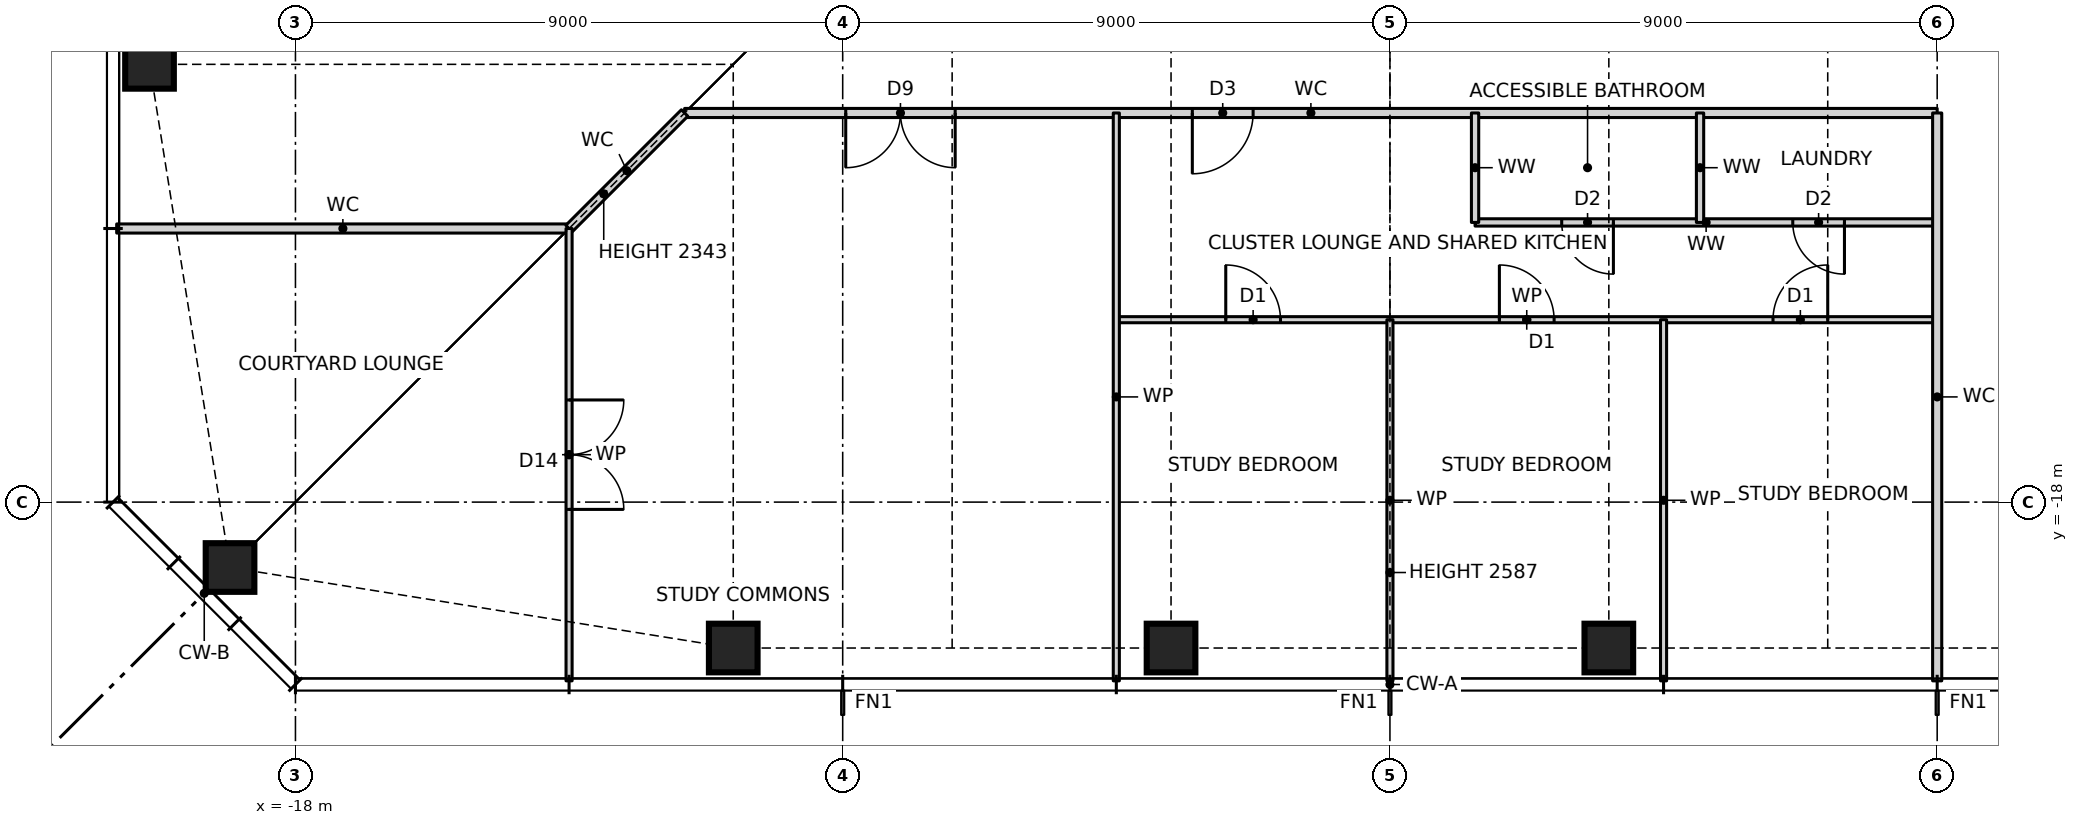
"""IFC4 building model, lengths in metres.
Left out: names, types, materials, properties, quantities, classifications, styles, units other than length and angle.
Written with IfcOpenShell. Run it as: python <this file> out.ifc"""

import sys

from ifc_helpers import new_model, si_unit, direction, frame, frame_2d, origin, origin_2d, place, context, subcontext, project, spatial, rectangle, hollow_rectangle, extrude, element, fill, save


model = new_model("IFC4")
c1 = context("Model", 3, precision=1e-05, world=origin(), true_north=direction((0.0, 1.0)))
c2 = subcontext(c1, "Body", "Model", "MODEL_VIEW")
j1 = project(units=[si_unit("LENGTHUNIT", "METRE"), si_unit("PLANEANGLEUNIT", "RADIAN")], contexts=[c1])
p1 = place(None, origin())
s1 = spatial("IfcSite", under=j1, at=p1, CompositionType="ELEMENT")
p2 = place(p1, origin())
s2 = spatial("IfcBuilding", under=s1, at=p2, CompositionType="ELEMENT")
p3 = place(p2, frame((0.0, 0.0, 112.0)))
s3 = spatial("IfcBuildingStorey", under=s2, at=p3, CompositionType="ELEMENT", Elevation=112.0)
for number, where, z_axis, x_axis in (
    (1, (-19.076, -19.076, 0.0), (0.0, 0.0, 1.0), (1.0, 0.0, 0.0)),
    (2, (-10.8, -20.4, 0.0), (0.0, 0.0, 1.0), (1.0, 0.0, 0.0)),
    (3, (-3.6, -20.4, 0.0), (0.0, 0.0, 1.0), (1.0, 0.0, 0.0)),
    (4, (3.6, -20.4, 0.0), (0.0, 0.0, 1.0), (1.0, 0.0, 0.0)),
    (5, (-20.4, -10.8, 0.0), (0.0, 0.0, 1.0), (1.0, 0.0, 0.0)),
):
    element("IfcColumn", number, at=place(p3, frame(where, z_axis=z_axis, x_axis=x_axis)), inside=s3, PredefinedType="COLUMN", context=c2, shape_type="SweptSolid", body=[
        extrude(hollow_rectangle(XDim=0.8, YDim=0.8, WallThickness=0.07, at=origin_2d()), origin(), (0.0, 0.0, 1.0), 3.5),
    ])
p4 = place(p3, frame((-4.5, -15.0, 0.0), z_axis=(0.0, 0.0, 1.0), x_axis=(1.0, 0.0, 0.0)))
e6 = element("IfcWall", 6, at=p4, inside=s3, PredefinedType="PARTITIONING", context=c2, shape_type="SweptSolid", body=[
    extrude(rectangle(XDim=13.5, YDim=0.1, at=frame_2d((6.75, 0.0))), origin(), (0.0, 0.0, 1.0), 3.27),
])
p5 = place(p4, frame((1.8, 0.0, 0.0)))
e7 = element("IfcOpeningElement", 7, at=p5, cuts=e6, PredefinedType="OPENING", context=c2, shape_type="SweptSolid", body=[
    extrude(rectangle(XDim=0.9, YDim=2.1, at=frame_2d((0.45, 1.05))), frame((0.0, 0.06, 0.0), z_axis=(0.0, -1.0, 0.0), x_axis=(1.0, 0.0, 0.0)), (0.0, 0.0, 1.0), 0.12),
])
p6 = place(p4, frame((6.3, 0.0, 0.0)))
e8 = element("IfcOpeningElement", 8, at=p6, cuts=e6, PredefinedType="OPENING", context=c2, shape_type="SweptSolid", body=[
    extrude(rectangle(XDim=0.9, YDim=2.1, at=frame_2d((0.45, 1.05))), frame((0.0, 0.06, 0.0), z_axis=(0.0, -1.0, 0.0), x_axis=(1.0, 0.0, 0.0)), (0.0, 0.0, 1.0), 0.12),
])
p7 = place(p4, frame((10.8, 0.0, 0.0)))
e9 = element("IfcOpeningElement", 9, at=p7, cuts=e6, PredefinedType="OPENING", context=c2, shape_type="SweptSolid", body=[
    extrude(rectangle(XDim=0.9, YDim=2.1, at=frame_2d((0.45, 1.05))), frame((0.0, 0.06, 0.0), z_axis=(0.0, -1.0, 0.0), x_axis=(1.0, 0.0, 0.0)), (0.0, 0.0, 1.0), 0.12),
])
p8 = place(p3, frame((-20.94, -13.5, 0.0), z_axis=(0.0, 0.0, 1.0), x_axis=(1.0, 0.0, 0.0)))
e10 = element("IfcWall", 10, at=p8, inside=s3, PredefinedType="PARTITIONING", context=c2, shape_type="SweptSolid", body=[
    extrude(rectangle(XDim=7.44, YDim=0.15, at=frame_2d((3.72, 0.0))), origin(), (0.0, 0.0, 1.0), 3.27),
])
p9 = place(p3, frame((1.4, -13.4, 0.0), z_axis=(0.0, 0.0, 1.0), x_axis=(1.0, 0.0, 0.0)))
e11 = element("IfcWall", 11, at=p9, inside=s3, PredefinedType="PARTITIONING", context=c2, shape_type="SweptSolid", body=[
    extrude(rectangle(XDim=7.6, YDim=0.12, at=frame_2d((3.8, 0.0))), origin(), (0.0, 0.0, 1.0), 3.27),
])
p10 = place(p9, frame((1.425, 0.0, 0.0)))
e12 = element("IfcOpeningElement", 12, at=p10, cuts=e11, PredefinedType="OPENING", context=c2, shape_type="SweptSolid", body=[
    extrude(rectangle(XDim=0.85, YDim=2.1, at=frame_2d((0.425, 1.05))), frame((0.0, 0.07, 0.0), z_axis=(0.0, -1.0, 0.0), x_axis=(1.0, 0.0, 0.0)), (0.0, 0.0, 1.0), 0.14),
])
p11 = place(p9, frame((5.225, 0.0, 0.0)))
e13 = element("IfcOpeningElement", 13, at=p11, cuts=e11, PredefinedType="OPENING", context=c2, shape_type="SweptSolid", body=[
    extrude(rectangle(XDim=0.85, YDim=2.1, at=frame_2d((0.425, 1.05))), frame((0.0, 0.07, 0.0), z_axis=(0.0, -1.0, 0.0), x_axis=(1.0, 0.0, 0.0)), (0.0, 0.0, 1.0), 0.14),
])
p12 = place(p3, frame((-11.6, -11.6, 0.0), z_axis=(0.0, 0.0, 1.0), x_axis=(1.0, 0.0, 0.0)))
e14 = element("IfcWall", 14, at=p12, inside=s3, PredefinedType="PARTITIONING", context=c2, shape_type="SweptSolid", body=[
    extrude(rectangle(XDim=20.6, YDim=0.15, at=frame_2d((10.3, 0.0))), origin(), (0.0, 0.0, 1.0), 3.27),
])
p13 = place(p12, frame((2.65, 0.0, 0.0)))
e15 = element("IfcOpeningElement", 15, at=p13, cuts=e14, PredefinedType="OPENING", context=c2, shape_type="SweptSolid", body=[
    extrude(rectangle(XDim=1.8, YDim=2.1, at=frame_2d((0.9, 1.05))), frame((0.0, 0.085, 0.0), z_axis=(0.0, -1.0, 0.0), x_axis=(1.0, 0.0, 0.0)), (0.0, 0.0, 1.0), 0.17),
])
p14 = place(p12, frame((8.35, 0.0, 0.0)))
e16 = element("IfcOpeningElement", 16, at=p14, cuts=e14, PredefinedType="OPENING", context=c2, shape_type="SweptSolid", body=[
    extrude(rectangle(XDim=1.0, YDim=2.1, at=frame_2d((0.5, 1.05))), frame((0.0, 0.085, 0.0), z_axis=(0.0, -1.0, 0.0), x_axis=(1.0, 0.0, 0.0)), (0.0, 0.0, 1.0), 0.17),
])
p15 = place(p3, frame((-13.5, -13.5, 0.0), z_axis=(0.0, 0.0, 1.0), x_axis=(0.707106781187, 0.707106781187, 0.0)))
e17 = element("IfcWall", 17, at=p15, inside=s3, PredefinedType="PARTITIONING", context=c2, shape_type="SweptSolid", body=[
    extrude(rectangle(XDim=2.687, YDim=0.15, at=frame_2d((1.343, 0.0))), origin(), (0.0, 0.0, 1.0), 2.343),
])
p16 = place(p3, frame((9.0, -20.94, 0.0), z_axis=(0.0, 0.0, 1.0), x_axis=(0.0, 1.0, 0.0)))
e18 = element("IfcWall", 18, at=p16, inside=s3, PredefinedType="PARTITIONING", context=c2, shape_type="SweptSolid", body=[
    extrude(rectangle(XDim=9.34, YDim=0.15, at=frame_2d((4.67, 0.0))), origin(), (0.0, 0.0, 1.0), 3.27),
])
p17 = place(p3, frame((5.1, -13.4, 0.0), z_axis=(0.0, 0.0, 1.0), x_axis=(0.0, 1.0, 0.0)))
e19 = element("IfcWall", 19, at=p17, inside=s3, PredefinedType="PARTITIONING", context=c2, shape_type="SweptSolid", body=[
    extrude(rectangle(XDim=1.8, YDim=0.12, at=frame_2d((0.9, 0.0))), origin(), (0.0, 0.0, 1.0), 3.27),
])
p18 = place(p3, frame((4.5, -20.94, 0.0), z_axis=(0.0, 0.0, 1.0), x_axis=(0.0, 1.0, 0.0)))
e20 = element("IfcWall", 20, at=p18, inside=s3, PredefinedType="PARTITIONING", context=c2, shape_type="SweptSolid", body=[
    extrude(rectangle(XDim=5.94, YDim=0.1, at=frame_2d((2.97, 0.0))), origin(), (0.0, 0.0, 1.0), 3.27),
])
p19 = place(p3, frame((1.4, -13.4, 0.0), z_axis=(0.0, 0.0, 1.0), x_axis=(0.0, 1.0, 0.0)))
e21 = element("IfcWall", 21, at=p19, inside=s3, PredefinedType="PARTITIONING", context=c2, shape_type="SweptSolid", body=[
    extrude(rectangle(XDim=1.8, YDim=0.12, at=frame_2d((0.9, 0.0))), origin(), (0.0, 0.0, 1.0), 3.27),
])
p20 = place(p3, frame((0.0, -20.94, 0.0), z_axis=(0.0, 0.0, 1.0), x_axis=(0.0, 1.0, 0.0)))
e22 = element("IfcWall", 22, at=p20, inside=s3, PredefinedType="PARTITIONING", context=c2, shape_type="SweptSolid", body=[
    extrude(rectangle(XDim=5.94, YDim=0.1, at=frame_2d((2.97, 0.0))), origin(), (0.0, 0.0, 1.0), 2.587),
])
p21 = place(p3, frame((-4.5, -20.94, 0.0), z_axis=(0.0, 0.0, 1.0), x_axis=(0.0, 1.0, 0.0)))
e23 = element("IfcWall", 23, at=p21, inside=s3, PredefinedType="PARTITIONING", context=c2, shape_type="SweptSolid", body=[
    extrude(rectangle(XDim=9.34, YDim=0.1, at=frame_2d((4.67, 0.0))), origin(), (0.0, 0.0, 1.0), 3.27),
])
p22 = place(p3, frame((-13.5, -20.94, 0.0), z_axis=(0.0, 0.0, 1.0), x_axis=(0.0, 1.0, 0.0)))
e24 = element("IfcWall", 24, at=p22, inside=s3, PredefinedType="PARTITIONING", context=c2, shape_type="SweptSolid", body=[
    extrude(rectangle(XDim=7.44, YDim=0.1, at=frame_2d((3.72, 0.0))), origin(), (0.0, 0.0, 1.0), 3.27),
])
p23 = place(p22, frame((2.82, 0.0, 0.0)))
e25 = element("IfcOpeningElement", 25, at=p23, cuts=e24, PredefinedType="OPENING", context=c2, shape_type="SweptSolid", body=[
    extrude(rectangle(XDim=1.8, YDim=2.1, at=frame_2d((0.9, 1.05))), frame((0.0, 0.06, 0.0), z_axis=(0.0, -1.0, 0.0), x_axis=(1.0, 0.0, 0.0)), (0.0, 0.0, 1.0), 0.12),
])
p24 = place(p13, frame((1.8, 0.0, 0.0), z_axis=(0.0, 0.0, 1.0), x_axis=(-1.0, 0.0, 0.0)))
e26 = element("IfcDoor", 26, at=p24, inside=s3, OperationType="DOUBLE_DOOR_SINGLE_SWING", PredefinedType="DOOR", context=c2, shape_type="SweptSolid", body=[
    extrude(rectangle(XDim=1.8, YDim=2.1, at=frame_2d((0.9, 1.05))), frame((0.0, 0.025, 0.0), z_axis=(0.0, -1.0, 0.0), x_axis=(1.0, 0.0, 0.0)), (0.0, 0.0, 1.0), 0.05),
])
fill(e15, e26)
p25 = place(p5, origin())
e27 = element("IfcDoor", 27, at=p25, inside=s3, OperationType="SINGLE_SWING_LEFT", PredefinedType="DOOR", context=c2, shape_type="SweptSolid", body=[
    extrude(rectangle(XDim=0.9, YDim=2.1, at=frame_2d((0.45, 1.05))), frame((0.0, 0.025, 0.0), z_axis=(0.0, -1.0, 0.0), x_axis=(1.0, 0.0, 0.0)), (0.0, 0.0, 1.0), 0.05),
])
fill(e7, e27)
p26 = place(p6, origin())
e28 = element("IfcDoor", 28, at=p26, inside=s3, OperationType="SINGLE_SWING_LEFT", PredefinedType="DOOR", context=c2, shape_type="SweptSolid", body=[
    extrude(rectangle(XDim=0.9, YDim=2.1, at=frame_2d((0.45, 1.05))), frame((0.0, 0.025, 0.0), z_axis=(0.0, -1.0, 0.0), x_axis=(1.0, 0.0, 0.0)), (0.0, 0.0, 1.0), 0.05),
])
fill(e8, e28)
p27 = place(p7, origin())
e29 = element("IfcDoor", 29, at=p27, inside=s3, OperationType="SINGLE_SWING_RIGHT", PredefinedType="DOOR", context=c2, shape_type="SweptSolid", body=[
    extrude(rectangle(XDim=0.9, YDim=2.1, at=frame_2d((0.45, 1.05))), frame((0.0, 0.025, 0.0), z_axis=(0.0, -1.0, 0.0), x_axis=(1.0, 0.0, 0.0)), (0.0, 0.0, 1.0), 0.05),
])
fill(e9, e29)
p28 = place(p14, frame((1.0, 0.0, 0.0), z_axis=(0.0, 0.0, 1.0), x_axis=(-1.0, 0.0, 0.0)))
e30 = element("IfcDoor", 30, at=p28, inside=s3, OperationType="SINGLE_SWING_RIGHT", PredefinedType="DOOR", context=c2, shape_type="SweptSolid", body=[
    extrude(rectangle(XDim=1.0, YDim=2.1, at=frame_2d((0.5, 1.05))), frame((0.0, 0.025, 0.0), z_axis=(0.0, -1.0, 0.0), x_axis=(1.0, 0.0, 0.0)), (0.0, 0.0, 1.0), 0.05),
])
fill(e16, e30)
p29 = place(p10, frame((0.85, 0.0, 0.0), z_axis=(0.0, 0.0, 1.0), x_axis=(-1.0, 0.0, 0.0)))
e31 = element("IfcDoor", 31, at=p29, inside=s3, OperationType="SINGLE_SWING_LEFT", PredefinedType="DOOR", context=c2, shape_type="SweptSolid", body=[
    extrude(rectangle(XDim=0.85, YDim=2.1, at=frame_2d((0.425, 1.05))), frame((0.0, 0.025, 0.0), z_axis=(0.0, -1.0, 0.0), x_axis=(1.0, 0.0, 0.0)), (0.0, 0.0, 1.0), 0.05),
])
fill(e12, e31)
p30 = place(p11, frame((0.85, 0.0, 0.0), z_axis=(0.0, 0.0, 1.0), x_axis=(-1.0, 0.0, 0.0)))
e32 = element("IfcDoor", 32, at=p30, inside=s3, OperationType="SINGLE_SWING_LEFT", PredefinedType="DOOR", context=c2, shape_type="SweptSolid", body=[
    extrude(rectangle(XDim=0.85, YDim=2.1, at=frame_2d((0.425, 1.05))), frame((0.0, 0.025, 0.0), z_axis=(0.0, -1.0, 0.0), x_axis=(1.0, 0.0, 0.0)), (0.0, 0.0, 1.0), 0.05),
])
fill(e13, e32)
p31 = place(p23, frame((1.8, 0.0, 0.0), z_axis=(0.0, 0.0, 1.0), x_axis=(-1.0, 0.0, 0.0)))
e33 = element("IfcDoor", 33, at=p31, inside=s3, OperationType="DOUBLE_DOOR_SINGLE_SWING", PredefinedType="DOOR", context=c2, shape_type="SweptSolid", body=[
    extrude(rectangle(XDim=1.8, YDim=2.1, at=frame_2d((0.9, 1.05))), frame((0.0, 0.025, 0.0), z_axis=(0.0, -1.0, 0.0), x_axis=(1.0, 0.0, 0.0)), (0.0, 0.0, 1.0), 0.05),
])
fill(e25, e33)
save(model, sys.argv[1])
